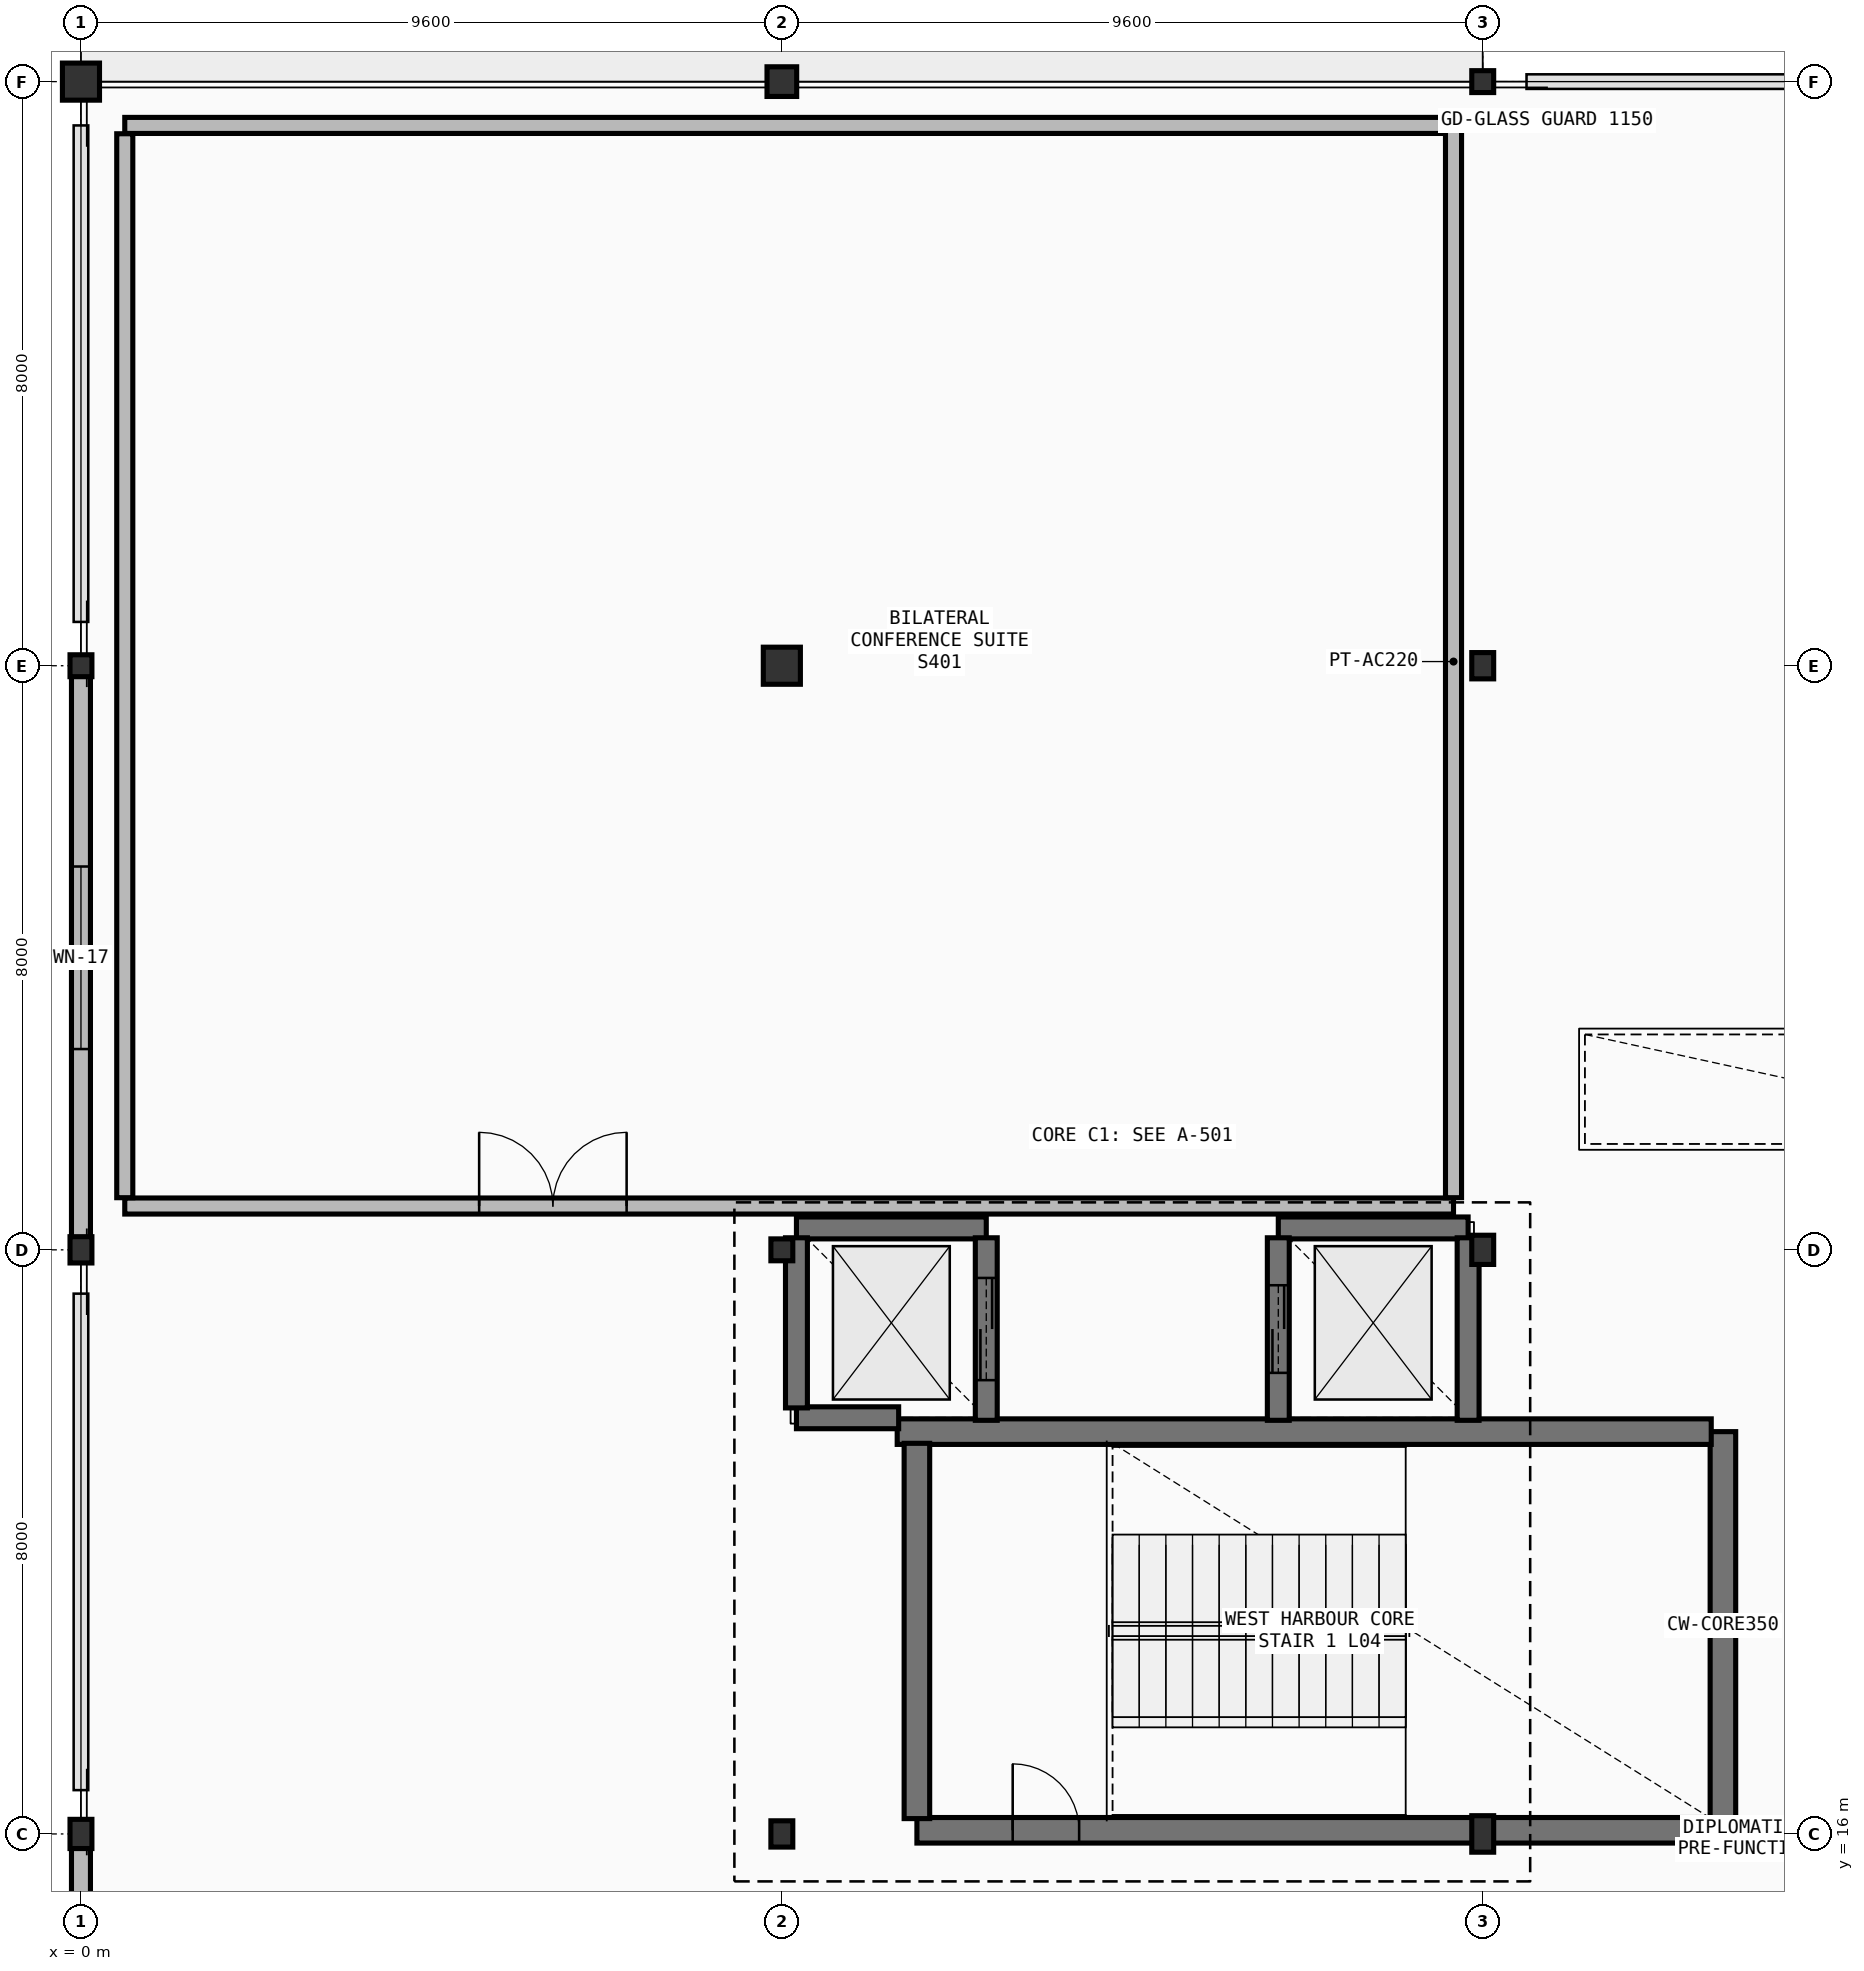
"""IFC4 building model, lengths in metres.
Left out: names, types, materials, properties, quantities, classifications, styles, units other than length and angle.
Written with IfcOpenShell. Run it as: python <this file> out.ifc"""

import sys

from ifc_helpers import new_model, si_unit, direction, frame, frame_2d, origin, origin_2d, place, context, subcontext, project, spatial, rectangle, hollow_circle, i_section, extrude, element, fill, save


model = new_model("IFC4")
c1 = context("Model", 3, precision=1e-05, world=origin(), true_north=direction((0.0, 1.0)))
c2 = subcontext(c1, "Body", "Model", "MODEL_VIEW")
j1 = project(units=[si_unit("LENGTHUNIT", "METRE"), si_unit("PLANEANGLEUNIT", "RADIAN")], contexts=[c1])
p1 = place(None, origin())
s1 = spatial("IfcSite", under=j1, at=p1, CompositionType="ELEMENT")
p2 = place(p1, origin())
s2 = spatial("IfcBuilding", under=s1, at=p2, CompositionType="ELEMENT")
p3 = place(p2, frame((0.0, 0.0, 20.4)))
s3 = spatial("IfcBuildingStorey", under=s2, at=p3, CompositionType="ELEMENT", Elevation=20.4)
p4 = place(p3, frame((0.0, 16.0, 0.0), z_axis=(0.0, 0.0, 1.0), x_axis=(1.0, 0.0, 0.0)))
e1 = element("IfcColumn", 1, at=p4, inside=s3, PredefinedType="COLUMN", context=c2, shape_type="SweptSolid", body=[
    extrude(i_section(OverallWidth=0.3, OverallDepth=0.4, WebThickness=0.013, FlangeThickness=0.024, FilletRadius=0.027, at=origin_2d()), origin(), (0.0, 0.0, 1.0), 4.5),
])
p5 = place(p3, frame((0.0, 24.0, 0.0), z_axis=(0.0, 0.0, 1.0), x_axis=(1.0, 0.0, 0.0)))
e2 = element("IfcColumn", 2, at=p5, inside=s3, PredefinedType="COLUMN", context=c2, shape_type="SweptSolid", body=[
    extrude(i_section(OverallWidth=0.3, OverallDepth=0.36, WebThickness=0.012, FlangeThickness=0.022, FilletRadius=0.027, at=origin_2d()), origin(), (0.0, 0.0, 1.0), 4.5),
])
p6 = place(p3, frame((0.0, 32.0, 0.0), z_axis=(0.0, 0.0, 1.0), x_axis=(1.0, 0.0, 0.0)))
e3 = element("IfcColumn", 3, at=p6, inside=s3, PredefinedType="COLUMN", context=c2, shape_type="SweptSolid", body=[
    extrude(i_section(OverallWidth=0.3, OverallDepth=0.3, WebThickness=0.011, FlangeThickness=0.019, FilletRadius=0.027, at=origin_2d()), origin(), (0.0, 0.0, 1.0), 4.5),
])
p7 = place(p3, frame((0.0, 40.0, 0.0), z_axis=(0.0, 0.0, 1.0), x_axis=(1.0, 0.0, 0.0)))
e4 = element("IfcColumn", 4, at=p7, inside=s3, PredefinedType="COLUMN", context=c2, shape_type="SweptSolid", body=[
    extrude(hollow_circle(Radius=0.254, WallThickness=0.025, at=origin_2d()), origin(), (0.0, 0.0, 1.0), 4.5),
])
p8 = place(p3, frame((9.6, 16.0, 0.0), z_axis=(0.0, 0.0, 1.0), x_axis=(1.0, 0.0, 0.0)))
e5 = element("IfcColumn", 5, at=p8, inside=s3, PredefinedType="COLUMN", context=c2, shape_type="SweptSolid", body=[
    extrude(i_section(OverallWidth=0.3, OverallDepth=0.36, WebThickness=0.012, FlangeThickness=0.022, FilletRadius=0.027, at=origin_2d()), origin(), (0.0, 0.0, 1.0), 4.5),
])
p9 = place(p3, frame((9.6, 24.0, 0.0), z_axis=(0.0, 0.0, 1.0), x_axis=(1.0, 0.0, 0.0)))
e6 = element("IfcColumn", 6, at=p9, inside=s3, PredefinedType="COLUMN", context=c2, shape_type="SweptSolid", body=[
    extrude(i_section(OverallWidth=0.3, OverallDepth=0.3, WebThickness=0.011, FlangeThickness=0.019, FilletRadius=0.027, at=origin_2d()), origin(), (0.0, 0.0, 1.0), 4.5),
])
p10 = place(p3, frame((9.6, 32.0, 0.0), z_axis=(0.0, 0.0, 1.0), x_axis=(1.0, 0.0, 0.0)))
e7 = element("IfcColumn", 7, at=p10, inside=s3, PredefinedType="COLUMN", context=c2, shape_type="SweptSolid", body=[
    extrude(hollow_circle(Radius=0.254, WallThickness=0.025, at=origin_2d()), origin(), (0.0, 0.0, 1.0), 4.5),
])
p11 = place(p3, frame((9.6, 40.0, 0.0), z_axis=(0.0, 0.0, 1.0), x_axis=(1.0, 0.0, 0.0)))
e8 = element("IfcColumn", 8, at=p11, inside=s3, PredefinedType="COLUMN", context=c2, shape_type="SweptSolid", body=[
    extrude(hollow_circle(Radius=0.203, WallThickness=0.02, at=origin_2d()), origin(), (0.0, 0.0, 1.0), 4.5),
])
p12 = place(p3, frame((19.2, 16.0, 0.0), z_axis=(0.0, 0.0, 1.0), x_axis=(1.0, 0.0, 0.0)))
e9 = element("IfcColumn", 9, at=p12, inside=s3, PredefinedType="COLUMN", context=c2, shape_type="SweptSolid", body=[
    extrude(i_section(OverallWidth=0.3, OverallDepth=0.5, WebThickness=0.014, FlangeThickness=0.028, FilletRadius=0.027, at=origin_2d()), origin(), (0.0, 0.0, 1.0), 4.5),
])
p13 = place(p3, frame((19.2, 24.0, 0.0), z_axis=(0.0, 0.0, 1.0), x_axis=(1.0, 0.0, 0.0)))
e10 = element("IfcColumn", 10, at=p13, inside=s3, PredefinedType="COLUMN", context=c2, shape_type="SweptSolid", body=[
    extrude(i_section(OverallWidth=0.3, OverallDepth=0.4, WebThickness=0.013, FlangeThickness=0.024, FilletRadius=0.027, at=origin_2d()), origin(), (0.0, 0.0, 1.0), 4.5),
])
p14 = place(p3, frame((19.2, 32.0, 0.0), z_axis=(0.0, 0.0, 1.0), x_axis=(1.0, 0.0, 0.0)))
e11 = element("IfcColumn", 11, at=p14, inside=s3, PredefinedType="COLUMN", context=c2, shape_type="SweptSolid", body=[
    extrude(i_section(OverallWidth=0.3, OverallDepth=0.36, WebThickness=0.012, FlangeThickness=0.022, FilletRadius=0.027, at=origin_2d()), origin(), (0.0, 0.0, 1.0), 4.5),
])
p15 = place(p3, frame((19.2, 40.0, 0.0), z_axis=(0.0, 0.0, 1.0), x_axis=(1.0, 0.0, 0.0)))
e12 = element("IfcColumn", 12, at=p15, inside=s3, PredefinedType="COLUMN", context=c2, shape_type="SweptSolid", body=[
    extrude(i_section(OverallWidth=0.3, OverallDepth=0.3, WebThickness=0.011, FlangeThickness=0.019, FilletRadius=0.027, at=origin_2d()), origin(), (0.0, 0.0, 1.0), 4.5),
])
p16 = place(p3, frame((0.0, 8.0, 0.0), z_axis=(0.0, 0.0, 1.0), x_axis=(0.0, 1.0, 0.0)))
e13 = element("IfcWall", 13, at=p16, inside=s3, PredefinedType="STANDARD", context=c2, shape_type="SweptSolid", body=[
    extrude(rectangle(XDim=8.0, YDim=0.26, at=frame_2d((4.0, 0.0))), origin(), (0.0, 0.0, 1.0), 3.78),
])
p17 = place(p16, frame((2.95, 0.0, 0.9)))
e14 = element("IfcOpeningElement", 14, at=p17, cuts=e13, PredefinedType="OPENING", context=c2, shape_type="SweptSolid", body=[
    extrude(rectangle(XDim=2.1, YDim=1.5, at=frame_2d((1.05, 0.75))), frame((0.0, 0.14, 0.0), z_axis=(0.0, -1.0, 0.0), x_axis=(1.0, 0.0, 0.0)), (0.0, 0.0, 1.0), 0.28),
])
p18 = place(p3, frame((0.0, 24.0, 0.0), z_axis=(0.0, 0.0, 1.0), x_axis=(0.0, 1.0, 0.0)))
e15 = element("IfcWall", 15, at=p18, inside=s3, PredefinedType="STANDARD", context=c2, shape_type="SweptSolid", body=[
    extrude(rectangle(XDim=8.0, YDim=0.26, at=frame_2d((4.0, 0.0))), origin(), (0.0, 0.0, 1.0), 3.78),
])
p19 = place(p18, frame((2.75, 0.0, 0.9)))
e16 = element("IfcOpeningElement", 16, at=p19, cuts=e15, PredefinedType="OPENING", context=c2, shape_type="SweptSolid", body=[
    extrude(rectangle(XDim=2.5, YDim=1.6, at=frame_2d((1.25, 0.8))), frame((0.0, 0.14, 0.0), z_axis=(0.0, -1.0, 0.0), x_axis=(1.0, 0.0, 0.0)), (0.0, 0.0, 1.0), 0.28),
])
p20 = place(p3, frame((11.45, 16.05, 0.0), z_axis=(0.0, 0.0, 1.0), x_axis=(1.0, 0.0, 0.0)))
e17 = element("IfcWall", 17, at=p20, inside=s3, PredefinedType="SHEAR", context=c2, shape_type="SweptSolid", body=[
    extrude(rectangle(XDim=11.04, YDim=0.35, at=frame_2d((5.52, 0.0))), origin(), (0.0, 0.0, 1.0), 4.25),
])
p21 = place(p20, frame((1.312, 0.0, 0.0)))
e18 = element("IfcOpeningElement", 18, at=p21, cuts=e17, PredefinedType="OPENING", context=c2, shape_type="SweptSolid", body=[
    extrude(rectangle(XDim=0.91, YDim=2.08, at=frame_2d((0.455, 1.04))), frame((0.0, 0.185, 0.0), z_axis=(0.0, -1.0, 0.0), x_axis=(1.0, 0.0, 0.0)), (0.0, 0.0, 1.0), 0.37),
])
p22 = place(p3, frame((22.49, 16.21, 0.0), z_axis=(0.0, 0.0, 1.0), x_axis=(0.0, 1.0, 0.0)))
e19 = element("IfcWall", 19, at=p22, inside=s3, PredefinedType="SHEAR", context=c2, shape_type="SweptSolid", body=[
    extrude(rectangle(XDim=5.3, YDim=0.35, at=frame_2d((2.65, 0.0))), origin(), (0.0, 0.0, 1.0), 4.25),
])
p23 = place(p3, frame((22.33, 21.51, 0.0), z_axis=(0.0, 0.0, 1.0), x_axis=(-1.0, 0.0, 0.0)))
e20 = element("IfcWall", 20, at=p23, inside=s3, PredefinedType="SHEAR", context=c2, shape_type="SweptSolid", body=[
    extrude(rectangle(XDim=11.15, YDim=0.35, at=frame_2d((5.575, 0.0))), origin(), (0.0, 0.0, 1.0), 4.25),
])
p24 = place(p3, frame((11.45, 21.35, 0.0), z_axis=(0.0, 0.0, 1.0), x_axis=(0.0, -1.0, 0.0)))
e21 = element("IfcWall", 21, at=p24, inside=s3, PredefinedType="SHEAR", context=c2, shape_type="SweptSolid", body=[
    extrude(rectangle(XDim=5.14, YDim=0.35, at=frame_2d((2.57, 0.0))), origin(), (0.0, 0.0, 1.0), 4.25),
])
p25 = place(p3, frame((12.4, 24.3, 0.0), z_axis=(0.0, 0.0, 1.0), x_axis=(-1.0, 0.0, 0.0)))
e22 = element("IfcWall", 22, at=p25, inside=s3, PredefinedType="SHEAR", context=c2, shape_type="SweptSolid", body=[
    extrude(rectangle(XDim=2.6, YDim=0.3, at=frame_2d((1.3, 0.0))), origin(), (0.0, 0.0, 1.0), 4.25),
])
p26 = place(p3, frame((9.8, 21.7, 0.0), z_axis=(0.0, 0.0, 1.0), x_axis=(1.0, 0.0, 0.0)))
e23 = element("IfcWall", 23, at=p26, inside=s3, PredefinedType="SHEAR", context=c2, shape_type="SweptSolid", body=[
    extrude(rectangle(XDim=1.4, YDim=0.3, at=frame_2d((0.7, 0.0))), origin(), (0.0, 0.0, 1.0), 4.25),
])
p27 = place(p3, frame((12.4, 21.665, 0.0), z_axis=(0.0, 0.0, 1.0), x_axis=(0.0, 1.0, 0.0)))
e24 = element("IfcWall", 24, at=p27, inside=s3, PredefinedType="SHEAR", context=c2, shape_type="SweptSolid", body=[
    extrude(rectangle(XDim=2.5, YDim=0.3, at=frame_2d((1.25, 0.0))), origin(), (0.0, 0.0, 1.0), 4.25),
])
p28 = place(p27, frame((0.55, 0.0, 0.0)))
e25 = element("IfcOpeningElement", 25, at=p28, cuts=e24, PredefinedType="OPENING", context=c2, shape_type="SweptSolid", body=[
    extrude(rectangle(XDim=1.4, YDim=2.26, at=frame_2d((0.7, 1.13))), frame((0.0, 0.16, 0.0), z_axis=(0.0, -1.0, 0.0), x_axis=(1.0, 0.0, 0.0)), (0.0, 0.0, 1.0), 0.32),
])
p29 = place(p3, frame((9.8, 24.165, 0.0), z_axis=(0.0, 0.0, 1.0), x_axis=(0.0, -1.0, 0.0)))
e26 = element("IfcWall", 26, at=p29, inside=s3, PredefinedType="SHEAR", context=c2, shape_type="SweptSolid", body=[
    extrude(rectangle(XDim=2.33, YDim=0.3, at=frame_2d((1.165, 0.0))), origin(), (0.0, 0.0, 1.0), 4.25),
])
p30 = place(p3, frame((19.0, 24.3, 0.0), z_axis=(0.0, 0.0, 1.0), x_axis=(-1.0, 0.0, 0.0)))
e27 = element("IfcWall", 27, at=p30, inside=s3, PredefinedType="SHEAR", context=c2, shape_type="SweptSolid", body=[
    extrude(rectangle(XDim=2.6, YDim=0.3, at=frame_2d((1.3, 0.0))), origin(), (0.0, 0.0, 1.0), 4.25),
])
p31 = place(p3, frame((19.0, 21.665, 0.0), z_axis=(0.0, 0.0, 1.0), x_axis=(0.0, 1.0, 0.0)))
e28 = element("IfcWall", 28, at=p31, inside=s3, PredefinedType="SHEAR", context=c2, shape_type="SweptSolid", body=[
    extrude(rectangle(XDim=2.5, YDim=0.3, at=frame_2d((1.25, 0.0))), origin(), (0.0, 0.0, 1.0), 4.25),
])
p32 = place(p3, frame((16.4, 24.165, 0.0), z_axis=(0.0, 0.0, 1.0), x_axis=(0.0, -1.0, 0.0)))
e29 = element("IfcWall", 29, at=p32, inside=s3, PredefinedType="SHEAR", context=c2, shape_type="SweptSolid", body=[
    extrude(rectangle(XDim=2.5, YDim=0.3, at=frame_2d((1.25, 0.0))), origin(), (0.0, 0.0, 1.0), 4.25),
])
p33 = place(p32, frame((0.65, 0.0, 0.0)))
e30 = element("IfcOpeningElement", 30, at=p33, cuts=e29, PredefinedType="OPENING", context=c2, shape_type="SweptSolid", body=[
    extrude(rectangle(XDim=1.2, YDim=2.2, at=frame_2d((0.6, 1.1))), frame((0.0, 0.16, 0.0), z_axis=(0.0, -1.0, 0.0), x_axis=(1.0, 0.0, 0.0)), (0.0, 0.0, 1.0), 0.32),
])
p34 = place(p3, frame((0.6, 24.6, 0.0), z_axis=(0.0, 0.0, 1.0), x_axis=(1.0, 0.0, 0.0)))
e31 = element("IfcWall", 31, at=p34, inside=s3, PredefinedType="PARTITIONING", context=c2, shape_type="SweptSolid", body=[
    extrude(rectangle(XDim=18.2, YDim=0.22, at=frame_2d((9.1, 0.0))), origin(), (0.0, 0.0, 1.0), 3.62),
])
p35 = place(p34, frame((4.854, 0.0, 0.0)))
e32 = element("IfcOpeningElement", 32, at=p35, cuts=e31, PredefinedType="OPENING", context=c2, shape_type="SweptSolid", body=[
    extrude(rectangle(XDim=2.02, YDim=2.34, at=frame_2d((1.01, 1.17))), frame((0.0, 0.12, 0.0), z_axis=(0.0, -1.0, 0.0), x_axis=(1.0, 0.0, 0.0)), (0.0, 0.0, 1.0), 0.24),
])
p36 = place(p3, frame((18.8, 24.714, 0.0), z_axis=(0.0, 0.0, 1.0), x_axis=(0.0, 1.0, 0.0)))
e33 = element("IfcWall", 33, at=p36, inside=s3, PredefinedType="PARTITIONING", context=c2, shape_type="SweptSolid", body=[
    extrude(rectangle(XDim=14.686, YDim=0.22, at=frame_2d((7.343, 0.0))), origin(), (0.0, 0.0, 1.0), 3.72),
])
p37 = place(p3, frame((18.686, 39.4, 0.0), z_axis=(0.0, 0.0, 1.0), x_axis=(-1.0, 0.0, 0.0)))
e34 = element("IfcWall", 34, at=p37, inside=s3, PredefinedType="PARTITIONING", context=c2, shape_type="SweptSolid", body=[
    extrude(rectangle(XDim=18.086, YDim=0.22, at=frame_2d((9.043, 0.0))), origin(), (0.0, 0.0, 1.0), 3.67),
])
p38 = place(p3, frame((0.6, 39.286, 0.0), z_axis=(0.0, 0.0, 1.0), x_axis=(0.0, -1.0, 0.0)))
e35 = element("IfcWall", 35, at=p38, inside=s3, PredefinedType="PARTITIONING", context=c2, shape_type="SweptSolid", body=[
    extrude(rectangle(XDim=14.572, YDim=0.22, at=frame_2d((7.286, 0.0))), origin(), (0.0, 0.0, 1.0), 3.68),
])
p39 = place(p19, origin())
e36 = element("IfcWindow", 36, at=p39, inside=s3, PartitioningType="SINGLE_PANEL", PredefinedType="WINDOW", context=c2, shape_type="SweptSolid", body=[
    extrude(rectangle(XDim=2.5, YDim=1.6, at=frame_2d((1.25, 0.8))), frame((0.0, 0.03, 0.0), z_axis=(0.0, -1.0, 0.0), x_axis=(1.0, 0.0, 0.0)), (0.0, 0.0, 1.0), 0.06),
])
fill(e16, e36)
p40 = place(p21, origin())
e37 = element("IfcDoor", 37, at=p40, inside=s3, OperationType="SINGLE_SWING_RIGHT", PredefinedType="DOOR", context=c2, shape_type="SweptSolid", body=[
    extrude(rectangle(XDim=0.91, YDim=2.08, at=frame_2d((0.455, 1.04))), frame((0.0, 0.025, 0.0), z_axis=(0.0, -1.0, 0.0), x_axis=(1.0, 0.0, 0.0)), (0.0, 0.0, 1.0), 0.05),
])
fill(e18, e37)
p41 = place(p28, origin())
e38 = element("IfcDoor", 38, at=p41, inside=s3, OperationType="DOUBLE_DOOR_SLIDING", PredefinedType="DOOR", context=c2, shape_type="SweptSolid", body=[
    extrude(rectangle(XDim=1.4, YDim=2.26, at=frame_2d((0.7, 1.13))), frame((0.0, 0.025, 0.0), z_axis=(0.0, -1.0, 0.0), x_axis=(1.0, 0.0, 0.0)), (0.0, 0.0, 1.0), 0.05),
])
fill(e25, e38)
p42 = place(p33, origin())
e39 = element("IfcDoor", 39, at=p42, inside=s3, OperationType="DOUBLE_DOOR_SLIDING", PredefinedType="DOOR", context=c2, shape_type="SweptSolid", body=[
    extrude(rectangle(XDim=1.2, YDim=2.2, at=frame_2d((0.6, 1.1))), frame((0.0, 0.025, 0.0), z_axis=(0.0, -1.0, 0.0), x_axis=(1.0, 0.0, 0.0)), (0.0, 0.0, 1.0), 0.05),
])
fill(e30, e39)
p43 = place(p35, origin())
e40 = element("IfcDoor", 40, at=p43, inside=s3, OperationType="DOUBLE_DOOR_SINGLE_SWING", PredefinedType="DOOR", context=c2, shape_type="SweptSolid", body=[
    extrude(rectangle(XDim=2.02, YDim=2.34, at=frame_2d((1.01, 1.17))), frame((0.0, 0.025, 0.0), z_axis=(0.0, -1.0, 0.0), x_axis=(1.0, 0.0, 0.0)), (0.0, 0.0, 1.0), 0.05),
])
fill(e32, e40)
save(model, sys.argv[1])
